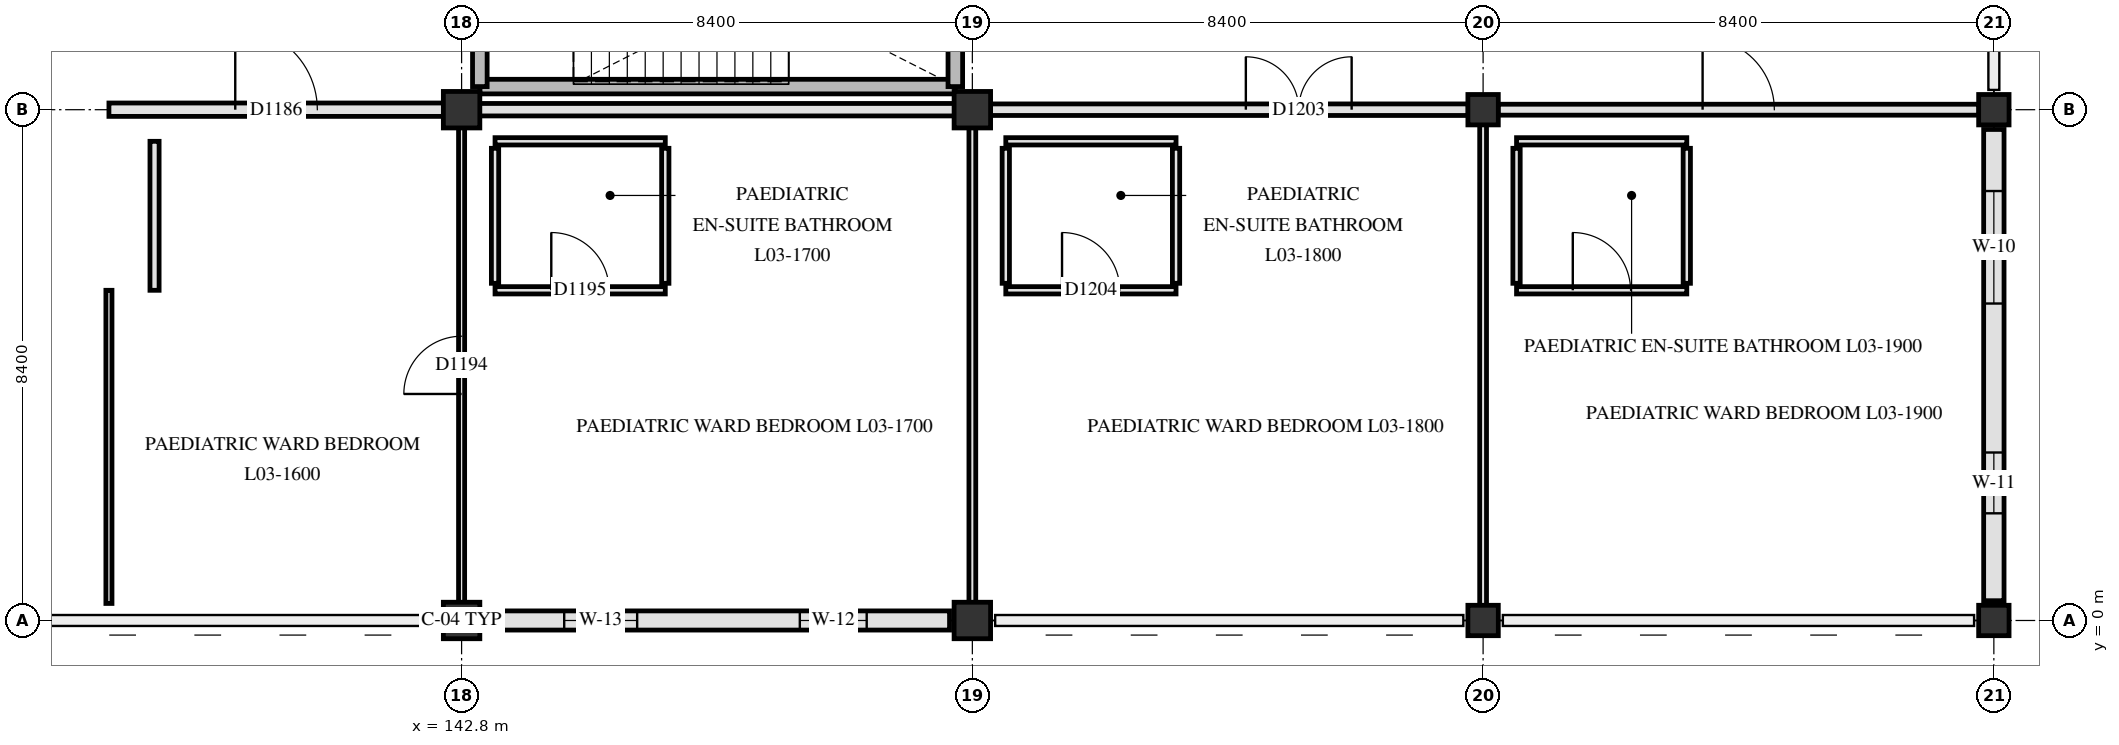
"""IFC4 building model, lengths in metres.
Left out: names, types, materials, properties, quantities, classifications, styles, units other than length and angle.
Written with IfcOpenShell. Run it as: python <this file> out.ifc"""

import sys

from ifc_helpers import new_model, si_unit, direction, frame, frame_2d, origin, origin_2d, place, context, subcontext, project, spatial, rectangle, extrude, element, fill, save


model = new_model("IFC4")
c1 = context("Model", 3, precision=1e-05, world=origin(), true_north=direction((0.0, 1.0)))
c2 = subcontext(c1, "Body", "Model", "MODEL_VIEW")
j1 = project(units=[si_unit("LENGTHUNIT", "METRE"), si_unit("PLANEANGLEUNIT", "RADIAN")], contexts=[c1])
p1 = place(None, origin())
s1 = spatial("IfcSite", under=j1, at=p1, CompositionType="ELEMENT")
p2 = place(p1, origin())
s2 = spatial("IfcBuilding", under=s1, at=p2, CompositionType="ELEMENT")
p3 = place(p2, frame((0.0, 0.0, 14.4)))
s3 = spatial("IfcBuildingStorey", under=s2, at=p3, CompositionType="ELEMENT", Elevation=14.4)
for number, where, z_axis, x_axis in (
    (1, (142.8, 0.0, 0.0), (0.0, 0.0, 1.0), (1.0, 0.0, 0.0)),
    (2, (142.8, 8.4, 0.0), (0.0, 0.0, 1.0), (1.0, 0.0, 0.0)),
    (3, (151.2, 0.0, 0.0), (0.0, 0.0, 1.0), (1.0, 0.0, 0.0)),
    (4, (151.2, 8.4, 0.0), (0.0, 0.0, 1.0), (1.0, 0.0, 0.0)),
):
    element("IfcColumn", number, at=place(p3, frame(where, z_axis=z_axis, x_axis=x_axis)), inside=s3, PredefinedType="COLUMN", context=c2, shape_type="SweptSolid", body=[
        extrude(rectangle(XDim=0.6, YDim=0.6, at=origin_2d()), origin(), (0.0, 0.0, 1.0), 4.2),
    ])
for number, where, z_axis, x_axis in (
    (5, (159.6, 0.0, 0.0), (0.0, 0.0, 1.0), (1.0, 0.0, 0.0)),
    (6, (159.6, 8.4, 0.0), (0.0, 0.0, 1.0), (1.0, 0.0, 0.0)),
    (7, (168.0, 0.0, 0.0), (0.0, 0.0, 1.0), (1.0, 0.0, 0.0)),
    (8, (168.0, 8.4, 0.0), (0.0, 0.0, 1.0), (1.0, 0.0, 0.0)),
):
    element("IfcColumn", number, at=place(p3, frame(where, z_axis=z_axis, x_axis=x_axis)), inside=s3, PredefinedType="COLUMN", context=c2, shape_type="SweptSolid", body=[
        extrude(rectangle(XDim=0.5, YDim=0.5, at=origin_2d()), origin(), (0.0, 0.0, 1.0), 4.2),
    ])
p4 = place(p3, frame((168.0, 8.075, 0.0), z_axis=(0.0, 0.0, 1.0), x_axis=(0.0, -1.0, 0.0)))
e9 = element("IfcWall", 9, at=p4, inside=s3, PredefinedType="SOLIDWALL", context=c2, shape_type="SweptSolid", body=[
    extrude(rectangle(XDim=7.75, YDim=0.335, at=frame_2d((3.875, 0.0))), origin(), (0.0, 0.0, 1.0), 2.89),
])
p5 = place(p4, frame((1.012, 0.0, 0.85)))
e10 = element("IfcOpeningElement", 10, at=p5, cuts=e9, PredefinedType="OPENING", context=c2, shape_type="SweptSolid", body=[
    extrude(rectangle(XDim=1.85, YDim=1.3, at=frame_2d((0.925, 0.65))), frame((0.0, 0.177, 0.0), z_axis=(0.0, -1.0, 0.0), x_axis=(1.0, 0.0, 0.0)), (0.0, 0.0, 1.0), 0.355),
])
p6 = place(p4, frame((5.312, 0.0, 0.85)))
e11 = element("IfcOpeningElement", 11, at=p6, cuts=e9, PredefinedType="OPENING", context=c2, shape_type="SweptSolid", body=[
    extrude(rectangle(XDim=1.0, YDim=1.42, at=frame_2d((0.5, 0.71))), frame((0.0, 0.177, 0.0), z_axis=(0.0, -1.0, 0.0), x_axis=(1.0, 0.0, 0.0)), (0.0, 0.0, 1.0), 0.355),
])
p7 = place(p3, frame((150.825, 0.0, 0.0), z_axis=(0.0, 0.0, 1.0), x_axis=(-1.0, 0.0, 0.0)))
e12 = element("IfcWall", 12, at=p7, inside=s3, PredefinedType="SOLIDWALL", context=c2, shape_type="SweptSolid", body=[
    extrude(rectangle(XDim=7.65, YDim=0.315, at=frame_2d((3.825, 0.0))), origin(), (0.0, 0.0, 1.0), 2.89),
])
p8 = place(p7, frame((1.363, 0.0, 0.85)))
e13 = element("IfcOpeningElement", 13, at=p8, cuts=e12, PredefinedType="OPENING", context=c2, shape_type="SweptSolid", body=[
    extrude(rectangle(XDim=1.1, YDim=1.42, at=frame_2d((0.55, 0.71))), frame((0.0, 0.167, 0.0), z_axis=(0.0, -1.0, 0.0), x_axis=(1.0, 0.0, 0.0)), (0.0, 0.0, 1.0), 0.335),
])
p9 = place(p7, frame((5.137, 0.0, 0.85)))
e14 = element("IfcOpeningElement", 14, at=p9, cuts=e12, PredefinedType="OPENING", context=c2, shape_type="SweptSolid", body=[
    extrude(rectangle(XDim=1.2, YDim=1.42, at=frame_2d((0.6, 0.71))), frame((0.0, 0.167, 0.0), z_axis=(0.0, -1.0, 0.0), x_axis=(1.0, 0.0, 0.0)), (0.0, 0.0, 1.0), 0.335),
])
p10 = place(p3, frame((143.1, 8.78, 0.0), z_axis=(0.0, 0.0, 1.0), x_axis=(1.0, 0.0, 0.0)))
e15 = element("IfcWall", 15, at=p10, inside=s3, PredefinedType="SHEAR", context=c2, shape_type="SweptSolid", body=[
    extrude(rectangle(XDim=7.82, YDim=0.24, at=frame_2d((3.91, 0.0))), origin(), (0.0, 0.0, 1.0), 3.9),
])
for number, where, z_axis, x_axis in (
    (16, (143.1, 8.78, 0.0), (0.0, 0.0, 1.0), (0.0, 1.0, 0.0)),
    (17, (150.92, 8.78, 0.0), (0.0, 0.0, 1.0), (0.0, 1.0, 0.0)),
):
    element("IfcWall", number, at=place(p3, frame(where, z_axis=z_axis, x_axis=x_axis)), inside=s3, PredefinedType="SHEAR", context=c2, shape_type="SweptSolid", body=[
        extrude(rectangle(XDim=3.32, YDim=0.24, at=frame_2d((1.66, 0.0))), origin(), (0.0, 0.0, 1.0), 3.9),
    ])
p11 = place(p3, frame((143.35, 5.43, 0.0), z_axis=(0.0, 0.0, 1.0), x_axis=(1.0, 0.0, 0.0)))
e18 = element("IfcWall", 18, at=p11, inside=s3, PredefinedType="PARTITIONING", context=c2, shape_type="SweptSolid", body=[
    extrude(rectangle(XDim=2.8, YDim=0.12, at=frame_2d((1.4, 0.0))), origin(), (0.0, 0.0, 1.0), 3.89),
])
p12 = place(p11, frame((0.925, 0.0, 0.0)))
e19 = element("IfcOpeningElement", 19, at=p12, cuts=e18, PredefinedType="OPENING", context=c2, shape_type="SweptSolid", body=[
    extrude(rectangle(XDim=0.95, YDim=2.1, at=frame_2d((0.475, 1.05))), frame((0.0, 0.07, 0.0), z_axis=(0.0, -1.0, 0.0), x_axis=(1.0, 0.0, 0.0)), (0.0, 0.0, 1.0), 0.14),
])
p13 = place(p3, frame((151.75, 5.43, 0.0), z_axis=(0.0, 0.0, 1.0), x_axis=(1.0, 0.0, 0.0)))
e20 = element("IfcWall", 20, at=p13, inside=s3, PredefinedType="PARTITIONING", context=c2, shape_type="SweptSolid", body=[
    extrude(rectangle(XDim=2.8, YDim=0.12, at=frame_2d((1.4, 0.0))), origin(), (0.0, 0.0, 1.0), 3.89),
])
p14 = place(p13, frame((0.925, 0.0, 0.0)))
e21 = element("IfcOpeningElement", 21, at=p14, cuts=e20, PredefinedType="OPENING", context=c2, shape_type="SweptSolid", body=[
    extrude(rectangle(XDim=0.95, YDim=2.1, at=frame_2d((0.475, 1.05))), frame((0.0, 0.07, 0.0), z_axis=(0.0, -1.0, 0.0), x_axis=(1.0, 0.0, 0.0)), (0.0, 0.0, 1.0), 0.14),
])
p15 = place(p3, frame((160.15, 5.43, 0.0), z_axis=(0.0, 0.0, 1.0), x_axis=(1.0, 0.0, 0.0)))
e22 = element("IfcWall", 22, at=p15, inside=s3, PredefinedType="PARTITIONING", context=c2, shape_type="SweptSolid", body=[
    extrude(rectangle(XDim=2.8, YDim=0.12, at=frame_2d((1.4, 0.0))), origin(), (0.0, 0.0, 1.0), 3.89),
])
p16 = place(p15, frame((0.925, 0.0, 0.0)))
e23 = element("IfcOpeningElement", 23, at=p16, cuts=e22, PredefinedType="OPENING", context=c2, shape_type="SweptSolid", body=[
    extrude(rectangle(XDim=0.95, YDim=2.1, at=frame_2d((0.475, 1.05))), frame((0.0, 0.07, 0.0), z_axis=(0.0, -1.0, 0.0), x_axis=(1.0, 0.0, 0.0)), (0.0, 0.0, 1.0), 0.14),
])
p17 = place(p3, frame((143.35, 7.88, 0.0), z_axis=(0.0, 0.0, 1.0), x_axis=(1.0, 0.0, 0.0)))
e24 = element("IfcWall", 24, at=p17, inside=s3, PredefinedType="PARTITIONING", context=c2, shape_type="SweptSolid", body=[
    extrude(rectangle(XDim=2.8, YDim=0.12, at=frame_2d((1.4, 0.0))), origin(), (0.0, 0.0, 1.0), 3.89),
])
for number, where, z_axis, x_axis in (
    (25, (151.75, 7.88, 0.0), (0.0, 0.0, 1.0), (1.0, 0.0, 0.0)),
    (26, (160.15, 7.88, 0.0), (0.0, 0.0, 1.0), (1.0, 0.0, 0.0)),
):
    element("IfcWall", number, at=place(p3, frame(where, z_axis=z_axis, x_axis=x_axis)), inside=s3, PredefinedType="PARTITIONING", context=c2, shape_type="SweptSolid", body=[
        extrude(rectangle(XDim=2.8, YDim=0.12, at=frame_2d((1.4, 0.0))), origin(), (0.0, 0.0, 1.0), 3.89),
    ])
p18 = place(p3, frame((137.0, 8.4, 0.0), z_axis=(0.0, 0.0, 1.0), x_axis=(1.0, 0.0, 0.0)))
e27 = element("IfcWall", 27, at=p18, inside=s3, PredefinedType="PARTITIONING", context=c2, shape_type="SweptSolid", body=[
    extrude(rectangle(XDim=5.505, YDim=0.22, at=frame_2d((2.752, 0.0))), origin(), (0.0, 0.0, 1.0), 3.29),
])
p19 = place(p18, frame((2.077, 0.0, 0.0)))
e28 = element("IfcOpeningElement", 28, at=p19, cuts=e27, PredefinedType="OPENING", context=c2, shape_type="SweptSolid", body=[
    extrude(rectangle(XDim=1.35, YDim=2.2, at=frame_2d((0.675, 1.1))), frame((0.0, 0.12, 0.0), z_axis=(0.0, -1.0, 0.0), x_axis=(1.0, 0.0, 0.0)), (0.0, 0.0, 1.0), 0.24),
])
p20 = place(p3, frame((143.095, 8.4, 0.0), z_axis=(0.0, 0.0, 1.0), x_axis=(1.0, 0.0, 0.0)))
e29 = element("IfcWall", 29, at=p20, inside=s3, PredefinedType="PARTITIONING", context=c2, shape_type="SweptSolid", body=[
    extrude(rectangle(XDim=7.81, YDim=0.205, at=frame_2d((3.905, 0.0))), origin(), (0.0, 0.0, 1.0), 3.29),
])
p21 = place(p3, frame((151.495, 8.4, 0.0), z_axis=(0.0, 0.0, 1.0), x_axis=(1.0, 0.0, 0.0)))
e30 = element("IfcWall", 30, at=p21, inside=s3, PredefinedType="PARTITIONING", context=c2, shape_type="SweptSolid", body=[
    extrude(rectangle(XDim=7.86, YDim=0.19, at=frame_2d((3.93, 0.0))), origin(), (0.0, 0.0, 1.0), 3.29),
])
p22 = place(p21, frame((4.203, 0.0, 0.0)))
e31 = element("IfcOpeningElement", 31, at=p22, cuts=e30, PredefinedType="OPENING", context=c2, shape_type="SweptSolid", body=[
    extrude(rectangle(XDim=1.74, YDim=2.24, at=frame_2d((0.87, 1.12))), frame((0.0, 0.105, 0.0), z_axis=(0.0, -1.0, 0.0), x_axis=(1.0, 0.0, 0.0)), (0.0, 0.0, 1.0), 0.21),
])
p23 = place(p3, frame((159.845, 8.4, 0.0), z_axis=(0.0, 0.0, 1.0), x_axis=(1.0, 0.0, 0.0)))
e32 = element("IfcWall", 32, at=p23, inside=s3, PredefinedType="PARTITIONING", context=c2, shape_type="SweptSolid", body=[
    extrude(rectangle(XDim=7.91, YDim=0.18, at=frame_2d((3.955, 0.0))), origin(), (0.0, 0.0, 1.0), 3.29),
])
p24 = place(p23, frame((3.365, 0.0, 0.0)))
e33 = element("IfcOpeningElement", 33, at=p24, cuts=e32, PredefinedType="OPENING", context=c2, shape_type="SweptSolid", body=[
    extrude(rectangle(XDim=1.18, YDim=2.18, at=frame_2d((0.59, 1.09))), frame((0.0, 0.1, 0.0), z_axis=(0.0, -1.0, 0.0), x_axis=(1.0, 0.0, 0.0)), (0.0, 0.0, 1.0), 0.2),
])
p25 = place(p3, frame((137.0, 0.28, 0.0), z_axis=(0.0, 0.0, 1.0), x_axis=(0.0, 1.0, 0.0)))
e34 = element("IfcWall", 34, at=p25, inside=s3, PredefinedType="PARTITIONING", context=c2, shape_type="SweptSolid", body=[
    extrude(rectangle(XDim=5.15, YDim=0.1, at=frame_2d((2.575, 0.0))), origin(), (0.0, 0.0, 1.0), 2.89),
])
p26 = place(p3, frame((137.75, 5.43, 0.0), z_axis=(0.0, 0.0, 1.0), x_axis=(0.0, 1.0, 0.0)))
e35 = element("IfcWall", 35, at=p26, inside=s3, PredefinedType="PARTITIONING", context=c2, shape_type="SweptSolid", body=[
    extrude(rectangle(XDim=2.45, YDim=0.15, at=frame_2d((1.225, 0.0))), origin(), (0.0, 0.0, 1.0), 3.89),
])
p27 = place(p3, frame((142.8, 0.295, 0.0), z_axis=(0.0, 0.0, 1.0), x_axis=(0.0, 1.0, 0.0)))
e36 = element("IfcWall", 36, at=p27, inside=s3, PredefinedType="PARTITIONING", context=c2, shape_type="SweptSolid", body=[
    extrude(rectangle(XDim=7.81, YDim=0.1, at=frame_2d((3.905, 0.0))), origin(), (0.0, 0.0, 1.0), 3.34),
])
p28 = place(p27, frame((3.43, 0.0, 0.0)))
e37 = element("IfcOpeningElement", 37, at=p28, cuts=e36, PredefinedType="OPENING", context=c2, shape_type="SweptSolid", body=[
    extrude(rectangle(XDim=0.95, YDim=2.1, at=frame_2d((0.475, 1.05))), frame((0.0, 0.06, 0.0), z_axis=(0.0, -1.0, 0.0), x_axis=(1.0, 0.0, 0.0)), (0.0, 0.0, 1.0), 0.12),
])
for number, where, z_axis, x_axis in (
    (38, (143.35, 5.545, 0.0), (0.0, 0.0, 1.0), (0.0, 1.0, 0.0)),
    (39, (146.15, 5.545, 0.0), (0.0, 0.0, 1.0), (0.0, 1.0, 0.0)),
):
    element("IfcWall", number, at=place(p3, frame(where, z_axis=z_axis, x_axis=x_axis)), inside=s3, PredefinedType="PARTITIONING", context=c2, shape_type="SweptSolid", body=[
        extrude(rectangle(XDim=2.22, YDim=0.12, at=frame_2d((1.11, 0.0))), origin(), (0.0, 0.0, 1.0), 3.89),
    ])
p29 = place(p3, frame((151.2, 0.295, 0.0), z_axis=(0.0, 0.0, 1.0), x_axis=(0.0, 1.0, 0.0)))
e40 = element("IfcWall", 40, at=p29, inside=s3, PredefinedType="PARTITIONING", context=c2, shape_type="SweptSolid", body=[
    extrude(rectangle(XDim=7.81, YDim=0.112, at=frame_2d((3.905, 0.0))), origin(), (0.0, 0.0, 1.0), 3.34),
])
for number, where, z_axis, x_axis in (
    (41, (151.75, 5.545, 0.0), (0.0, 0.0, 1.0), (0.0, 1.0, 0.0)),
    (42, (154.55, 5.545, 0.0), (0.0, 0.0, 1.0), (0.0, 1.0, 0.0)),
):
    element("IfcWall", number, at=place(p3, frame(where, z_axis=z_axis, x_axis=x_axis)), inside=s3, PredefinedType="PARTITIONING", context=c2, shape_type="SweptSolid", body=[
        extrude(rectangle(XDim=2.22, YDim=0.12, at=frame_2d((1.11, 0.0))), origin(), (0.0, 0.0, 1.0), 3.89),
    ])
p30 = place(p3, frame((159.6, 0.245, 0.0), z_axis=(0.0, 0.0, 1.0), x_axis=(0.0, 1.0, 0.0)))
e43 = element("IfcWall", 43, at=p30, inside=s3, PredefinedType="PARTITIONING", context=c2, shape_type="SweptSolid", body=[
    extrude(rectangle(XDim=7.91, YDim=0.112, at=frame_2d((3.955, 0.0))), origin(), (0.0, 0.0, 1.0), 3.34),
])
for number, where, z_axis, x_axis in (
    (44, (160.15, 5.545, 0.0), (0.0, 0.0, 1.0), (0.0, 1.0, 0.0)),
    (45, (162.95, 5.545, 0.0), (0.0, 0.0, 1.0), (0.0, 1.0, 0.0)),
):
    element("IfcWall", number, at=place(p3, frame(where, z_axis=z_axis, x_axis=x_axis)), inside=s3, PredefinedType="PARTITIONING", context=c2, shape_type="SweptSolid", body=[
        extrude(rectangle(XDim=2.22, YDim=0.12, at=frame_2d((1.11, 0.0))), origin(), (0.0, 0.0, 1.0), 3.89),
    ])
p31 = place(p5, origin())
e46 = element("IfcWindow", 46, at=p31, inside=s3, PartitioningType="SINGLE_PANEL", PredefinedType="WINDOW", context=c2, shape_type="SweptSolid", body=[
    extrude(rectangle(XDim=1.85, YDim=1.3, at=frame_2d((0.925, 0.65))), frame((0.0, 0.03, 0.0), z_axis=(0.0, -1.0, 0.0), x_axis=(1.0, 0.0, 0.0)), (0.0, 0.0, 1.0), 0.06),
])
fill(e10, e46)
p32 = place(p6, origin())
e47 = element("IfcWindow", 47, at=p32, inside=s3, PartitioningType="SINGLE_PANEL", PredefinedType="WINDOW", context=c2, shape_type="SweptSolid", body=[
    extrude(rectangle(XDim=1.0, YDim=1.42, at=frame_2d((0.5, 0.71))), frame((0.0, 0.03, 0.0), z_axis=(0.0, -1.0, 0.0), x_axis=(1.0, 0.0, 0.0)), (0.0, 0.0, 1.0), 0.06),
])
fill(e11, e47)
p33 = place(p8, origin())
e48 = element("IfcWindow", 48, at=p33, inside=s3, PartitioningType="SINGLE_PANEL", PredefinedType="WINDOW", context=c2, shape_type="SweptSolid", body=[
    extrude(rectangle(XDim=1.1, YDim=1.42, at=frame_2d((0.55, 0.71))), frame((0.0, 0.03, 0.0), z_axis=(0.0, -1.0, 0.0), x_axis=(1.0, 0.0, 0.0)), (0.0, 0.0, 1.0), 0.06),
])
fill(e13, e48)
p34 = place(p9, origin())
e49 = element("IfcWindow", 49, at=p34, inside=s3, PartitioningType="SINGLE_PANEL", PredefinedType="WINDOW", context=c2, shape_type="SweptSolid", body=[
    extrude(rectangle(XDim=1.2, YDim=1.42, at=frame_2d((0.6, 0.71))), frame((0.0, 0.03, 0.0), z_axis=(0.0, -1.0, 0.0), x_axis=(1.0, 0.0, 0.0)), (0.0, 0.0, 1.0), 0.06),
])
fill(e14, e49)
p35 = place(p19, origin())
e50 = element("IfcDoor", 50, at=p35, inside=s3, OperationType="SINGLE_SWING_LEFT", PredefinedType="DOOR", context=c2, shape_type="SweptSolid", body=[
    extrude(rectangle(XDim=1.35, YDim=2.2, at=frame_2d((0.675, 1.1))), frame((0.0, 0.025, 0.0), z_axis=(0.0, -1.0, 0.0), x_axis=(1.0, 0.0, 0.0)), (0.0, 0.0, 1.0), 0.05),
])
fill(e28, e50)
p36 = place(p28, origin())
e51 = element("IfcDoor", 51, at=p36, inside=s3, OperationType="SINGLE_SWING_LEFT", PredefinedType="DOOR", context=c2, shape_type="SweptSolid", body=[
    extrude(rectangle(XDim=0.95, YDim=2.1, at=frame_2d((0.475, 1.05))), frame((0.0, 0.025, 0.0), z_axis=(0.0, -1.0, 0.0), x_axis=(1.0, 0.0, 0.0)), (0.0, 0.0, 1.0), 0.05),
])
fill(e37, e51)
p37 = place(p12, origin())
e52 = element("IfcDoor", 52, at=p37, inside=s3, OperationType="SINGLE_SWING_LEFT", PredefinedType="DOOR", context=c2, shape_type="SweptSolid", body=[
    extrude(rectangle(XDim=0.95, YDim=2.1, at=frame_2d((0.475, 1.05))), frame((0.0, 0.025, 0.0), z_axis=(0.0, -1.0, 0.0), x_axis=(1.0, 0.0, 0.0)), (0.0, 0.0, 1.0), 0.05),
])
fill(e19, e52)
p38 = place(p22, origin())
e53 = element("IfcDoor", 53, at=p38, inside=s3, OperationType="DOUBLE_SWING_RIGHT", PredefinedType="DOOR", context=c2, shape_type="SweptSolid", body=[
    extrude(rectangle(XDim=1.74, YDim=2.24, at=frame_2d((0.87, 1.12))), frame((0.0, 0.025, 0.0), z_axis=(0.0, -1.0, 0.0), x_axis=(1.0, 0.0, 0.0)), (0.0, 0.0, 1.0), 0.05),
])
fill(e31, e53)
p39 = place(p14, origin())
e54 = element("IfcDoor", 54, at=p39, inside=s3, OperationType="SINGLE_SWING_LEFT", PredefinedType="DOOR", context=c2, shape_type="SweptSolid", body=[
    extrude(rectangle(XDim=0.95, YDim=2.1, at=frame_2d((0.475, 1.05))), frame((0.0, 0.025, 0.0), z_axis=(0.0, -1.0, 0.0), x_axis=(1.0, 0.0, 0.0)), (0.0, 0.0, 1.0), 0.05),
])
fill(e21, e54)
p40 = place(p24, origin())
e55 = element("IfcDoor", 55, at=p40, inside=s3, OperationType="SINGLE_SWING_LEFT", PredefinedType="DOOR", context=c2, shape_type="SweptSolid", body=[
    extrude(rectangle(XDim=1.18, YDim=2.18, at=frame_2d((0.59, 1.09))), frame((0.0, 0.025, 0.0), z_axis=(0.0, -1.0, 0.0), x_axis=(1.0, 0.0, 0.0)), (0.0, 0.0, 1.0), 0.05),
])
fill(e33, e55)
p41 = place(p16, origin())
e56 = element("IfcDoor", 56, at=p41, inside=s3, OperationType="SINGLE_SWING_LEFT", PredefinedType="DOOR", context=c2, shape_type="SweptSolid", body=[
    extrude(rectangle(XDim=0.95, YDim=2.1, at=frame_2d((0.475, 1.05))), frame((0.0, 0.025, 0.0), z_axis=(0.0, -1.0, 0.0), x_axis=(1.0, 0.0, 0.0)), (0.0, 0.0, 1.0), 0.05),
])
fill(e23, e56)
save(model, sys.argv[1])
